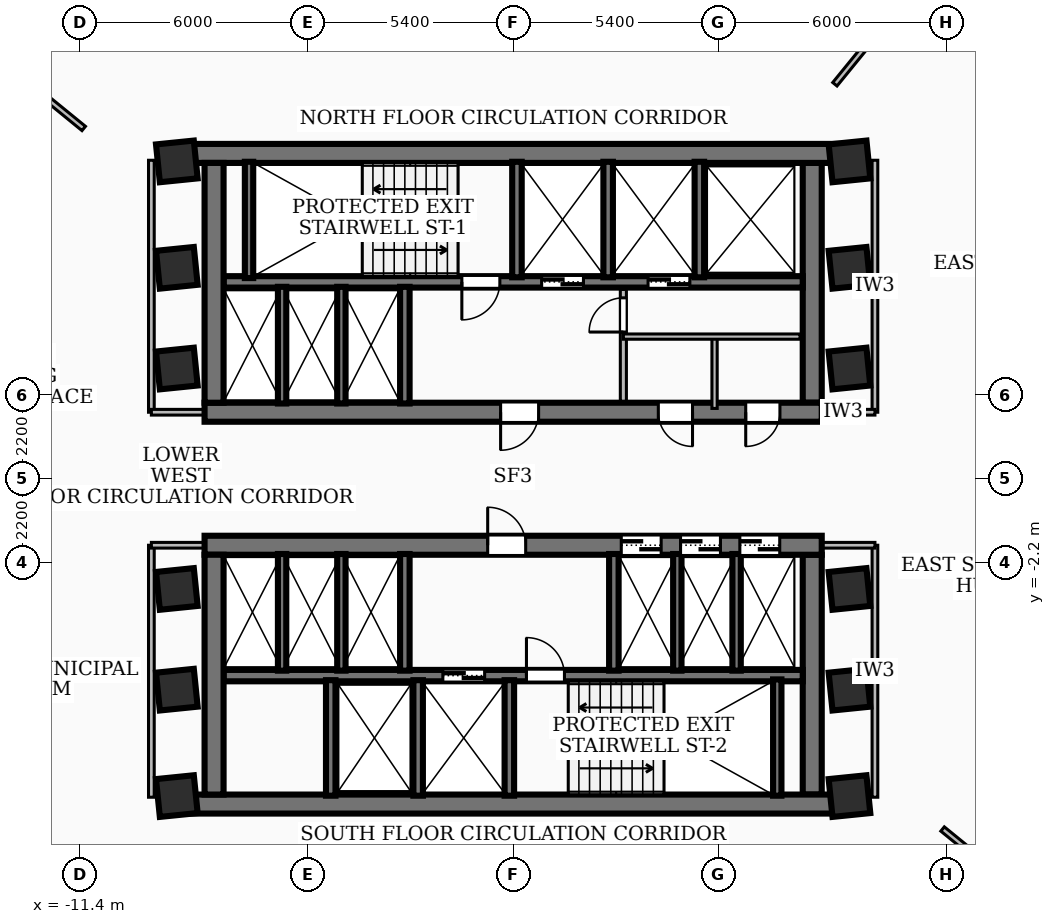
"""IFC4 building model, lengths in metres.
Left out: names, types, materials, properties, quantities, classifications, styles, units other than length and angle.
Written with IfcOpenShell. Run it as: python <this file> out.ifc"""

import sys

from ifc_helpers import new_model, si_unit, direction, frame, frame_2d, origin, origin_2d, place, context, subcontext, project, spatial, rectangle, extrude, element, fill, save


model = new_model("IFC4")
c1 = context("Model", 3, precision=1e-05, world=origin(), true_north=direction((0.0, 1.0)))
c2 = subcontext(c1, "Body", "Model", "MODEL_VIEW")
j1 = project(units=[si_unit("LENGTHUNIT", "METRE"), si_unit("PLANEANGLEUNIT", "RADIAN")], contexts=[c1])
p1 = place(None, origin())
s1 = spatial("IfcSite", under=j1, at=p1, CompositionType="ELEMENT")
p2 = place(p1, origin())
s2 = spatial("IfcBuilding", under=s1, at=p2, CompositionType="ELEMENT")
p3 = place(p2, frame((0.0, 0.0, 74.88)))
s3 = spatial("IfcBuildingStorey", under=s2, at=p3, CompositionType="ELEMENT", Elevation=74.88)
p4 = place(p3, frame((-8.78, 8.56, 0.0), z_axis=(0.0, 0.0, 1.0), x_axis=(1.0, 0.0, 0.0)))
e1 = element("IfcWall", 1, at=p4, inside=s3, PredefinedType="SHEAR", context=c2, shape_type="SweptSolid", body=[
    extrude(rectangle(XDim=17.56, YDim=0.5, at=frame_2d((8.78, 0.0))), origin(), (0.0, 0.0, 1.0), 3.34),
])
p5 = place(p3, frame((8.12, 1.75, 0.0), z_axis=(0.0, 0.0, 1.0), x_axis=(-1.0, 0.0, 0.0)))
e2 = element("IfcWall", 2, at=p5, inside=s3, PredefinedType="SHEAR", context=c2, shape_type="SweptSolid", body=[
    extrude(rectangle(XDim=16.24, YDim=0.5, at=frame_2d((8.12, 0.0))), origin(), (0.0, 0.0, 1.0), 3.34),
])
p6 = place(p5, frame((7.45, 0.0, 0.0)))
e3 = element("IfcOpeningElement", 3, at=p6, cuts=e2, PredefinedType="OPENING", context=c2, shape_type="SweptSolid", body=[
    extrude(rectangle(XDim=1.0, YDim=2.1, at=frame_2d((0.5, 1.05))), frame((0.0, 0.26, 0.0), z_axis=(0.0, -1.0, 0.0), x_axis=(1.0, 0.0, 0.0)), (0.0, 0.0, 1.0), 0.52),
])
p7 = place(p5, frame((3.4, 0.0, 0.0)))
e4 = element("IfcOpeningElement", 4, at=p7, cuts=e2, PredefinedType="OPENING", context=c2, shape_type="SweptSolid", body=[
    extrude(rectangle(XDim=0.9, YDim=2.06, at=frame_2d((0.45, 1.03))), frame((0.0, 0.26, 0.0), z_axis=(0.0, -1.0, 0.0), x_axis=(1.0, 0.0, 0.0)), (0.0, 0.0, 1.0), 0.52),
])
p8 = place(p5, frame((1.1, 0.0, 0.0)))
e5 = element("IfcOpeningElement", 5, at=p8, cuts=e2, PredefinedType="OPENING", context=c2, shape_type="SweptSolid", body=[
    extrude(rectangle(XDim=0.9, YDim=2.06, at=frame_2d((0.45, 1.03))), frame((0.0, 0.26, 0.0), z_axis=(0.0, -1.0, 0.0), x_axis=(1.0, 0.0, 0.0)), (0.0, 0.0, 1.0), 0.52),
])
for number, where, z_axis, x_axis in (
    (6, (-7.87, 2.0, 0.0), (0.0, 0.0, 1.0), (0.0, 1.0, 0.0)),
    (7, (7.87, 8.31, 0.0), (0.0, 0.0, 1.0), (0.0, -1.0, 0.0)),
):
    element("IfcWall", number, at=place(p3, frame(where, z_axis=z_axis, x_axis=x_axis)), inside=s3, PredefinedType="SHEAR", context=c2, shape_type="SweptSolid", body=[
        extrude(rectangle(XDim=6.31, YDim=0.5, at=frame_2d((3.155, 0.0))), origin(), (0.0, 0.0, 1.0), 3.34),
    ])
p9 = place(p3, frame((7.62, 5.18, 0.0), z_axis=(0.0, 0.0, 1.0), x_axis=(-1.0, 0.0, 0.0)))
e8 = element("IfcWall", 8, at=p9, inside=s3, PredefinedType="SOLIDWALL", context=c2, shape_type="SweptSolid", body=[
    extrude(rectangle(XDim=15.24, YDim=0.3, at=frame_2d((7.62, 0.0))), origin(), (0.0, 0.0, 1.0), 3.34),
])
p10 = place(p9, frame((5.77, 0.0, 0.0)))
e9 = element("IfcOpeningElement", 9, at=p10, cuts=e8, PredefinedType="OPENING", context=c2, shape_type="SweptSolid", body=[
    extrude(rectangle(XDim=1.1, YDim=2.15, at=frame_2d((0.55, 1.075))), frame((0.0, 0.16, 0.0), z_axis=(0.0, -1.0, 0.0), x_axis=(1.0, 0.0, 0.0)), (0.0, 0.0, 1.0), 0.32),
])
p11 = place(p9, frame((2.97, 0.0, 0.0)))
e10 = element("IfcOpeningElement", 10, at=p11, cuts=e8, PredefinedType="OPENING", context=c2, shape_type="SweptSolid", body=[
    extrude(rectangle(XDim=1.1, YDim=2.15, at=frame_2d((0.55, 1.075))), frame((0.0, 0.16, 0.0), z_axis=(0.0, -1.0, 0.0), x_axis=(1.0, 0.0, 0.0)), (0.0, 0.0, 1.0), 0.32),
])
p12 = place(p9, frame((7.97, 0.0, 0.0)))
e11 = element("IfcOpeningElement", 11, at=p12, cuts=e8, PredefinedType="OPENING", context=c2, shape_type="SweptSolid", body=[
    extrude(rectangle(XDim=1.0, YDim=2.1, at=frame_2d((0.5, 1.05))), frame((0.0, 0.16, 0.0), z_axis=(0.0, -1.0, 0.0), x_axis=(1.0, 0.0, 0.0)), (0.0, 0.0, 1.0), 0.32),
])
p13 = place(p3, frame((8.78, -8.56, 0.0), z_axis=(0.0, 0.0, 1.0), x_axis=(-1.0, 0.0, 0.0)))
e12 = element("IfcWall", 12, at=p13, inside=s3, PredefinedType="SHEAR", context=c2, shape_type="SweptSolid", body=[
    extrude(rectangle(XDim=17.56, YDim=0.5, at=frame_2d((8.78, 0.0))), origin(), (0.0, 0.0, 1.0), 3.34),
])
p14 = place(p3, frame((-8.12, -1.75, 0.0), z_axis=(0.0, 0.0, 1.0), x_axis=(1.0, 0.0, 0.0)))
e13 = element("IfcWall", 13, at=p14, inside=s3, PredefinedType="SHEAR", context=c2, shape_type="SweptSolid", body=[
    extrude(rectangle(XDim=16.24, YDim=0.5, at=frame_2d((8.12, 0.0))), origin(), (0.0, 0.0, 1.0), 3.34),
])
p15 = place(p14, frame((7.45, 0.0, 0.0)))
e14 = element("IfcOpeningElement", 14, at=p15, cuts=e13, PredefinedType="OPENING", context=c2, shape_type="SweptSolid", body=[
    extrude(rectangle(XDim=1.0, YDim=2.1, at=frame_2d((0.5, 1.05))), frame((0.0, 0.26, 0.0), z_axis=(0.0, -1.0, 0.0), x_axis=(1.0, 0.0, 0.0)), (0.0, 0.0, 1.0), 0.52),
])
p16 = place(p14, frame((10.965, 0.0, 0.0)))
e15 = element("IfcOpeningElement", 15, at=p16, cuts=e13, PredefinedType="OPENING", context=c2, shape_type="SweptSolid", body=[
    extrude(rectangle(XDim=1.05, YDim=2.15, at=frame_2d((0.525, 1.075))), frame((0.0, 0.26, 0.0), z_axis=(0.0, -1.0, 0.0), x_axis=(1.0, 0.0, 0.0)), (0.0, 0.0, 1.0), 0.52),
])
p17 = place(p14, frame((12.525, 0.0, 0.0)))
e16 = element("IfcOpeningElement", 16, at=p17, cuts=e13, PredefinedType="OPENING", context=c2, shape_type="SweptSolid", body=[
    extrude(rectangle(XDim=1.05, YDim=2.15, at=frame_2d((0.525, 1.075))), frame((0.0, 0.26, 0.0), z_axis=(0.0, -1.0, 0.0), x_axis=(1.0, 0.0, 0.0)), (0.0, 0.0, 1.0), 0.52),
])
p18 = place(p14, frame((14.085, 0.0, 0.0)))
e17 = element("IfcOpeningElement", 17, at=p18, cuts=e13, PredefinedType="OPENING", context=c2, shape_type="SweptSolid", body=[
    extrude(rectangle(XDim=1.05, YDim=2.15, at=frame_2d((0.525, 1.075))), frame((0.0, 0.26, 0.0), z_axis=(0.0, -1.0, 0.0), x_axis=(1.0, 0.0, 0.0)), (0.0, 0.0, 1.0), 0.52),
])
for number, where, z_axis, x_axis in (
    (18, (-7.87, -8.31, 0.0), (0.0, 0.0, 1.0), (0.0, 1.0, 0.0)),
    (19, (7.87, -2.0, 0.0), (0.0, 0.0, 1.0), (0.0, -1.0, 0.0)),
):
    element("IfcWall", number, at=place(p3, frame(where, z_axis=z_axis, x_axis=x_axis)), inside=s3, PredefinedType="SHEAR", context=c2, shape_type="SweptSolid", body=[
        extrude(rectangle(XDim=6.31, YDim=0.5, at=frame_2d((3.155, 0.0))), origin(), (0.0, 0.0, 1.0), 3.34),
    ])
p19 = place(p3, frame((-7.62, -5.18, 0.0), z_axis=(0.0, 0.0, 1.0), x_axis=(1.0, 0.0, 0.0)))
e20 = element("IfcWall", 20, at=p19, inside=s3, PredefinedType="SOLIDWALL", context=c2, shape_type="SweptSolid", body=[
    extrude(rectangle(XDim=15.24, YDim=0.3, at=frame_2d((7.62, 0.0))), origin(), (0.0, 0.0, 1.0), 3.34),
])
p20 = place(p19, frame((5.77, 0.0, 0.0)))
e21 = element("IfcOpeningElement", 21, at=p20, cuts=e20, PredefinedType="OPENING", context=c2, shape_type="SweptSolid", body=[
    extrude(rectangle(XDim=1.1, YDim=2.15, at=frame_2d((0.55, 1.075))), frame((0.0, 0.16, 0.0), z_axis=(0.0, -1.0, 0.0), x_axis=(1.0, 0.0, 0.0)), (0.0, 0.0, 1.0), 0.32),
])
p21 = place(p19, frame((7.97, 0.0, 0.0)))
e22 = element("IfcOpeningElement", 22, at=p21, cuts=e20, PredefinedType="OPENING", context=c2, shape_type="SweptSolid", body=[
    extrude(rectangle(XDim=1.0, YDim=2.1, at=frame_2d((0.5, 1.05))), frame((0.0, 0.16, 0.0), z_axis=(0.0, -1.0, 0.0), x_axis=(1.0, 0.0, 0.0)), (0.0, 0.0, 1.0), 0.32),
])
for number, where, z_axis, x_axis in (
    (23, (-6.95, 5.28, 0.0), (0.0, 0.0, 1.0), (0.0, 1.0, 0.0)),
    (24, (6.95, -8.34, 0.0), (0.0, 0.0, 1.0), (0.0, 1.0, 0.0)),
):
    element("IfcWall", number, at=place(p3, frame(where, z_axis=z_axis, x_axis=x_axis)), inside=s3, PredefinedType="SOLIDWALL", context=c2, shape_type="SweptSolid", body=[
        extrude(rectangle(XDim=3.06, YDim=0.22, at=frame_2d((1.53, 0.0))), origin(), (0.0, 0.0, 1.0), 3.34),
    ])
for number, where, z_axis, x_axis in (
    (25, (0.1, 5.3, 0.0), (0.0, 0.0, 1.0), (0.0, 1.0, 0.0)),
    (26, (2.5, 5.3, 0.0), (0.0, 0.0, 1.0), (0.0, 1.0, 0.0)),
    (27, (4.9, 5.3, 0.0), (0.0, 0.0, 1.0), (0.0, 1.0, 0.0)),
):
    element("IfcWall", number, at=place(p3, frame(where, z_axis=z_axis, x_axis=x_axis)), inside=s3, PredefinedType="SOLIDWALL", context=c2, shape_type="SweptSolid", body=[
        extrude(rectangle(XDim=3.04, YDim=0.25, at=frame_2d((1.52, 0.0))), origin(), (0.0, 0.0, 1.0), 3.34),
    ])
p22 = place(p3, frame((-2.85, 1.98, 0.0), z_axis=(0.0, 0.0, 1.0), x_axis=(0.0, 1.0, 0.0)))
e28 = element("IfcWall", 28, at=p22, inside=s3, PredefinedType="SOLIDWALL", context=c2, shape_type="SweptSolid", body=[
    extrude(rectangle(XDim=3.07, YDim=0.25, at=frame_2d((1.535, 0.0))), origin(), (0.0, 0.0, 1.0), 3.34),
])
for number, where, z_axis, x_axis in (
    (29, (-0.1, -8.34, 0.0), (0.0, 0.0, 1.0), (0.0, 1.0, 0.0)),
    (30, (-2.5, -8.34, 0.0), (0.0, 0.0, 1.0), (0.0, 1.0, 0.0)),
    (31, (-4.8, -8.34, 0.0), (0.0, 0.0, 1.0), (0.0, 1.0, 0.0)),
):
    element("IfcWall", number, at=place(p3, frame(where, z_axis=z_axis, x_axis=x_axis)), inside=s3, PredefinedType="SOLIDWALL", context=c2, shape_type="SweptSolid", body=[
        extrude(rectangle(XDim=3.04, YDim=0.25, at=frame_2d((1.52, 0.0))), origin(), (0.0, 0.0, 1.0), 3.34),
    ])
for number, where, z_axis, x_axis in (
    (32, (-2.85, -5.05, 0.0), (0.0, 0.0, 1.0), (0.0, 1.0, 0.0)),
    (33, (2.65, -5.05, 0.0), (0.0, 0.0, 1.0), (0.0, 1.0, 0.0)),
):
    element("IfcWall", number, at=place(p3, frame(where, z_axis=z_axis, x_axis=x_axis)), inside=s3, PredefinedType="SOLIDWALL", context=c2, shape_type="SweptSolid", body=[
        extrude(rectangle(XDim=3.07, YDim=0.25, at=frame_2d((1.535, 0.0))), origin(), (0.0, 0.0, 1.0), 3.34),
    ])
for number, where, z_axis, x_axis in (
    (34, (-6.08, 1.98, 0.0), (0.0, 0.0, 1.0), (0.0, 1.0, 0.0)),
    (35, (-4.52, 1.98, 0.0), (0.0, 0.0, 1.0), (0.0, 1.0, 0.0)),
    (36, (4.32, -5.05, 0.0), (0.0, 0.0, 1.0), (0.0, 1.0, 0.0)),
    (37, (5.88, -5.05, 0.0), (0.0, 0.0, 1.0), (0.0, 1.0, 0.0)),
    (38, (-6.08, -5.05, 0.0), (0.0, 0.0, 1.0), (0.0, 1.0, 0.0)),
    (39, (-4.52, -5.05, 0.0), (0.0, 0.0, 1.0), (0.0, 1.0, 0.0)),
):
    element("IfcWall", number, at=place(p3, frame(where, z_axis=z_axis, x_axis=x_axis)), inside=s3, PredefinedType="SOLIDWALL", context=c2, shape_type="SweptSolid", body=[
        extrude(rectangle(XDim=3.07, YDim=0.22, at=frame_2d((1.535, 0.0))), origin(), (0.0, 0.0, 1.0), 3.34),
    ])
for number, where, z_axis, x_axis in (
    (40, (-8.85, -5.55, 0.0), (0.0, 0.0, 1.0), (0.995, 0.101, 0.0)),
    (41, (-8.85, -2.9, 0.0), (0.0, 0.0, 1.0), (0.995, 0.101, 0.0)),
    (42, (-8.85, 2.9, 0.0), (0.0, 0.0, 1.0), (0.995, 0.101, 0.0)),
    (43, (-8.85, 5.55, 0.0), (0.0, 0.0, 1.0), (0.995, 0.101, 0.0)),
    (44, (8.85, -5.55, 0.0), (0.0, 0.0, 1.0), (0.995, 0.101, 0.0)),
    (45, (8.85, -2.9, 0.0), (0.0, 0.0, 1.0), (0.995, 0.101, 0.0)),
    (46, (8.85, 2.9, 0.0), (0.0, 0.0, 1.0), (0.995, 0.101, 0.0)),
    (47, (8.85, 5.55, 0.0), (0.0, 0.0, 1.0), (0.995, 0.101, 0.0)),
    (48, (-8.85, 8.35, 0.0), (0.0, 0.0, 1.0), (0.995, 0.101, 0.0)),
    (49, (8.85, -8.35, 0.0), (0.0, 0.0, 1.0), (0.995, 0.101, 0.0)),
    (50, (8.85, 8.35, 0.0), (0.0, 0.0, 1.0), (0.995, 0.101, 0.0)),
    (51, (-8.85, -8.35, 0.0), (0.0, 0.0, 1.0), (0.995, 0.101, 0.0)),
):
    element("IfcColumn", number, at=place(p3, frame(where, z_axis=z_axis, x_axis=x_axis)), inside=s3, PredefinedType="COLUMN", context=c2, shape_type="SweptSolid", body=[
        extrude(rectangle(XDim=1.0, YDim=1.0, at=origin_2d()), origin(), (0.0, 0.0, 1.0), 3.6),
    ])
p23 = place(p3, frame((2.9, 2.04, 0.0), z_axis=(0.0, 0.0, 1.0), x_axis=(0.0, 1.0, 0.0)))
e52 = element("IfcWall", 52, at=p23, inside=s3, PredefinedType="PARTITIONING", context=c2, shape_type="SweptSolid", body=[
    extrude(rectangle(XDim=2.94, YDim=0.16, at=frame_2d((1.47, 0.0))), origin(), (0.0, 0.0, 1.0), 2.405),
])
p24 = place(p23, frame((1.82, 0.0, 0.0)))
e53 = element("IfcOpeningElement", 53, at=p24, cuts=e52, PredefinedType="OPENING", context=c2, shape_type="SweptSolid", body=[
    extrude(rectangle(XDim=0.9, YDim=2.06, at=frame_2d((0.45, 1.03))), frame((0.0, 0.09, 0.0), z_axis=(0.0, -1.0, 0.0), x_axis=(1.0, 0.0, 0.0)), (0.0, 0.0, 1.0), 0.18),
])
p25 = place(p3, frame((2.9, 3.74, 0.0), z_axis=(0.0, 0.0, 1.0), x_axis=(1.0, 0.0, 0.0)))
e54 = element("IfcWall", 54, at=p25, inside=s3, PredefinedType="PARTITIONING", context=c2, shape_type="SweptSolid", body=[
    extrude(rectangle(XDim=4.65, YDim=0.138, at=frame_2d((2.325, 0.0))), origin(), (0.0, 0.0, 1.0), 3.34),
])
p26 = place(p3, frame((5.3, 1.85, 0.0), z_axis=(0.0, 0.0, 1.0), x_axis=(0.0, 1.0, 0.0)))
e55 = element("IfcWall", 55, at=p26, inside=s3, PredefinedType="PARTITIONING", context=c2, shape_type="SweptSolid", body=[
    extrude(rectangle(XDim=1.89, YDim=0.138, at=frame_2d((0.945, 0.0))), origin(), (0.0, 0.0, 1.0), 2.405),
])
p27 = place(p3, frame((-9.52, 1.75, 0.0), z_axis=(0.0, 0.0, 1.0), x_axis=(0.0, 1.0, 0.0)))
e56 = element("IfcWall", 56, at=p27, inside=s3, PredefinedType="PARTITIONING", context=c2, shape_type="SweptSolid", body=[
    extrude(rectangle(XDim=6.63, YDim=0.15, at=frame_2d((3.315, 0.0))), origin(), (0.0, 0.0, 1.0), 2.486),
])
p28 = place(p3, frame((-7.85, 1.75, 0.0), z_axis=(0.0, 0.0, 1.0), x_axis=(-1.0, 0.0, 0.0)))
e57 = element("IfcWall", 57, at=p28, inside=s3, PredefinedType="PARTITIONING", context=c2, shape_type="SweptSolid", body=[
    extrude(rectangle(XDim=1.67, YDim=0.15, at=frame_2d((0.835, 0.0))), origin(), (0.0, 0.0, 1.0), 2.405),
])
p29 = place(p3, frame((-9.52, -8.38, 0.0), z_axis=(0.0, 0.0, 1.0), x_axis=(0.0, 1.0, 0.0)))
e58 = element("IfcWall", 58, at=p29, inside=s3, PredefinedType="PARTITIONING", context=c2, shape_type="SweptSolid", body=[
    extrude(rectangle(XDim=6.63, YDim=0.15, at=frame_2d((3.315, 0.0))), origin(), (0.0, 0.0, 1.0), 2.486),
])
p30 = place(p3, frame((-7.85, -1.75, 0.0), z_axis=(0.0, 0.0, 1.0), x_axis=(-1.0, 0.0, 0.0)))
e59 = element("IfcWall", 59, at=p30, inside=s3, PredefinedType="PARTITIONING", context=c2, shape_type="SweptSolid", body=[
    extrude(rectangle(XDim=1.67, YDim=0.15, at=frame_2d((0.835, 0.0))), origin(), (0.0, 0.0, 1.0), 2.405),
])
p31 = place(p3, frame((9.52, 1.75, 0.0), z_axis=(0.0, 0.0, 1.0), x_axis=(0.0, 1.0, 0.0)))
e60 = element("IfcWall", 60, at=p31, inside=s3, PredefinedType="PARTITIONING", context=c2, shape_type="SweptSolid", body=[
    extrude(rectangle(XDim=6.63, YDim=0.15, at=frame_2d((3.315, 0.0))), origin(), (0.0, 0.0, 1.0), 2.486),
])
p32 = place(p3, frame((7.85, 1.75, 0.0), z_axis=(0.0, 0.0, 1.0), x_axis=(1.0, 0.0, 0.0)))
e61 = element("IfcWall", 61, at=p32, inside=s3, PredefinedType="PARTITIONING", context=c2, shape_type="SweptSolid", body=[
    extrude(rectangle(XDim=1.67, YDim=0.15, at=frame_2d((0.835, 0.0))), origin(), (0.0, 0.0, 1.0), 2.405),
])
p33 = place(p3, frame((9.52, -8.38, 0.0), z_axis=(0.0, 0.0, 1.0), x_axis=(0.0, 1.0, 0.0)))
e62 = element("IfcWall", 62, at=p33, inside=s3, PredefinedType="PARTITIONING", context=c2, shape_type="SweptSolid", body=[
    extrude(rectangle(XDim=6.63, YDim=0.15, at=frame_2d((3.315, 0.0))), origin(), (0.0, 0.0, 1.0), 2.486),
])
p34 = place(p3, frame((7.85, -1.75, 0.0), z_axis=(0.0, 0.0, 1.0), x_axis=(1.0, 0.0, 0.0)))
e63 = element("IfcWall", 63, at=p34, inside=s3, PredefinedType="PARTITIONING", context=c2, shape_type="SweptSolid", body=[
    extrude(rectangle(XDim=1.67, YDim=0.15, at=frame_2d((0.835, 0.0))), origin(), (0.0, 0.0, 1.0), 2.405),
])
p35 = place(p3, frame((8.466, 10.38, 0.0), z_axis=(0.0, 0.0, 1.0), x_axis=(0.631992375104, 0.774974604623, 0.0)))
e64 = element("IfcWall", 64, at=p35, inside=s3, PredefinedType="PARTITIONING", context=c2, shape_type="SweptSolid", body=[
    extrude(rectangle(XDim=6.26, YDim=0.145, at=frame_2d((3.13, 0.0))), origin(), (0.0, 0.0, 1.0), 2.644),
])
for number, where, z_axis, x_axis in (
    (65, (-11.3, 9.216, 0.0), (0.0, 0.0, 1.0), (-0.775, 0.632, 0.0)),
    (66, (11.3, -9.216, 0.0), (0.0, 0.0, 1.0), (0.775, -0.632, 0.0)),
):
    element("IfcWall", number, at=place(p3, frame(where, z_axis=z_axis, x_axis=x_axis)), inside=s3, PredefinedType="PARTITIONING", context=c2, shape_type="SweptSolid", body=[
        extrude(rectangle(XDim=5.073, YDim=0.145, at=frame_2d((2.536, 0.0))), origin(), (0.0, 0.0, 1.0), 3.34),
    ])
p36 = place(p6, origin())
e67 = element("IfcDoor", 67, at=p36, inside=s3, OperationType="SINGLE_SWING_RIGHT", PredefinedType="DOOR", context=c2, shape_type="SweptSolid", body=[
    extrude(rectangle(XDim=1.0, YDim=2.1, at=frame_2d((0.5, 1.05))), frame((0.0, 0.025, 0.0), z_axis=(0.0, -1.0, 0.0), x_axis=(1.0, 0.0, 0.0)), (0.0, 0.0, 1.0), 0.05),
])
fill(e3, e67)
p37 = place(p15, origin())
e68 = element("IfcDoor", 68, at=p37, inside=s3, OperationType="SINGLE_SWING_LEFT", PredefinedType="DOOR", context=c2, shape_type="SweptSolid", body=[
    extrude(rectangle(XDim=1.0, YDim=2.1, at=frame_2d((0.5, 1.05))), frame((0.0, 0.025, 0.0), z_axis=(0.0, -1.0, 0.0), x_axis=(1.0, 0.0, 0.0)), (0.0, 0.0, 1.0), 0.05),
])
fill(e14, e68)
p38 = place(p10, origin())
e69 = element("IfcDoor", 69, at=p38, inside=s3, OperationType="DOUBLE_DOOR_SLIDING", PredefinedType="DOOR", context=c2, shape_type="SweptSolid", body=[
    extrude(rectangle(XDim=1.1, YDim=2.15, at=frame_2d((0.55, 1.075))), frame((0.0, 0.025, 0.0), z_axis=(0.0, -1.0, 0.0), x_axis=(1.0, 0.0, 0.0)), (0.0, 0.0, 1.0), 0.05),
])
fill(e9, e69)
p39 = place(p11, origin())
e70 = element("IfcDoor", 70, at=p39, inside=s3, OperationType="DOUBLE_DOOR_SLIDING", PredefinedType="DOOR", context=c2, shape_type="SweptSolid", body=[
    extrude(rectangle(XDim=1.1, YDim=2.15, at=frame_2d((0.55, 1.075))), frame((0.0, 0.025, 0.0), z_axis=(0.0, -1.0, 0.0), x_axis=(1.0, 0.0, 0.0)), (0.0, 0.0, 1.0), 0.05),
])
fill(e10, e70)
p40 = place(p12, origin())
e71 = element("IfcDoor", 71, at=p40, inside=s3, OperationType="SINGLE_SWING_RIGHT", PredefinedType="DOOR", context=c2, shape_type="SweptSolid", body=[
    extrude(rectangle(XDim=1.0, YDim=2.1, at=frame_2d((0.5, 1.05))), frame((0.0, 0.025, 0.0), z_axis=(0.0, -1.0, 0.0), x_axis=(1.0, 0.0, 0.0)), (0.0, 0.0, 1.0), 0.05),
])
fill(e11, e71)
p41 = place(p20, origin())
e72 = element("IfcDoor", 72, at=p41, inside=s3, OperationType="DOUBLE_DOOR_SLIDING", PredefinedType="DOOR", context=c2, shape_type="SweptSolid", body=[
    extrude(rectangle(XDim=1.1, YDim=2.15, at=frame_2d((0.55, 1.075))), frame((0.0, 0.025, 0.0), z_axis=(0.0, -1.0, 0.0), x_axis=(1.0, 0.0, 0.0)), (0.0, 0.0, 1.0), 0.05),
])
fill(e21, e72)
p42 = place(p21, origin())
e73 = element("IfcDoor", 73, at=p42, inside=s3, OperationType="SINGLE_SWING_LEFT", PredefinedType="DOOR", context=c2, shape_type="SweptSolid", body=[
    extrude(rectangle(XDim=1.0, YDim=2.1, at=frame_2d((0.5, 1.05))), frame((0.0, 0.025, 0.0), z_axis=(0.0, -1.0, 0.0), x_axis=(1.0, 0.0, 0.0)), (0.0, 0.0, 1.0), 0.05),
])
fill(e22, e73)
p43 = place(p16, origin())
e74 = element("IfcDoor", 74, at=p43, inside=s3, OperationType="DOUBLE_DOOR_SLIDING", PredefinedType="DOOR", context=c2, shape_type="SweptSolid", body=[
    extrude(rectangle(XDim=1.05, YDim=2.15, at=frame_2d((0.525, 1.075))), frame((0.0, 0.025, 0.0), z_axis=(0.0, -1.0, 0.0), x_axis=(1.0, 0.0, 0.0)), (0.0, 0.0, 1.0), 0.05),
])
fill(e15, e74)
p44 = place(p17, origin())
e75 = element("IfcDoor", 75, at=p44, inside=s3, OperationType="DOUBLE_DOOR_SLIDING", PredefinedType="DOOR", context=c2, shape_type="SweptSolid", body=[
    extrude(rectangle(XDim=1.05, YDim=2.15, at=frame_2d((0.525, 1.075))), frame((0.0, 0.025, 0.0), z_axis=(0.0, -1.0, 0.0), x_axis=(1.0, 0.0, 0.0)), (0.0, 0.0, 1.0), 0.05),
])
fill(e16, e75)
p45 = place(p18, origin())
e76 = element("IfcDoor", 76, at=p45, inside=s3, OperationType="DOUBLE_DOOR_SLIDING", PredefinedType="DOOR", context=c2, shape_type="SweptSolid", body=[
    extrude(rectangle(XDim=1.05, YDim=2.15, at=frame_2d((0.525, 1.075))), frame((0.0, 0.025, 0.0), z_axis=(0.0, -1.0, 0.0), x_axis=(1.0, 0.0, 0.0)), (0.0, 0.0, 1.0), 0.05),
])
fill(e17, e76)
p46 = place(p7, origin())
e77 = element("IfcDoor", 77, at=p46, inside=s3, OperationType="SINGLE_SWING_LEFT", PredefinedType="DOOR", context=c2, shape_type="SweptSolid", body=[
    extrude(rectangle(XDim=0.9, YDim=2.06, at=frame_2d((0.45, 1.03))), frame((0.0, 0.025, 0.0), z_axis=(0.0, -1.0, 0.0), x_axis=(1.0, 0.0, 0.0)), (0.0, 0.0, 1.0), 0.05),
])
fill(e4, e77)
p47 = place(p8, origin())
e78 = element("IfcDoor", 78, at=p47, inside=s3, OperationType="SINGLE_SWING_RIGHT", PredefinedType="DOOR", context=c2, shape_type="SweptSolid", body=[
    extrude(rectangle(XDim=0.9, YDim=2.06, at=frame_2d((0.45, 1.03))), frame((0.0, 0.025, 0.0), z_axis=(0.0, -1.0, 0.0), x_axis=(1.0, 0.0, 0.0)), (0.0, 0.0, 1.0), 0.05),
])
fill(e5, e78)
p48 = place(p24, origin())
e79 = element("IfcDoor", 79, at=p48, inside=s3, OperationType="SINGLE_SWING_LEFT", PredefinedType="DOOR", context=c2, shape_type="SweptSolid", body=[
    extrude(rectangle(XDim=0.9, YDim=2.06, at=frame_2d((0.45, 1.03))), frame((0.0, 0.025, 0.0), z_axis=(0.0, -1.0, 0.0), x_axis=(1.0, 0.0, 0.0)), (0.0, 0.0, 1.0), 0.05),
])
fill(e53, e79)
save(model, sys.argv[1])
